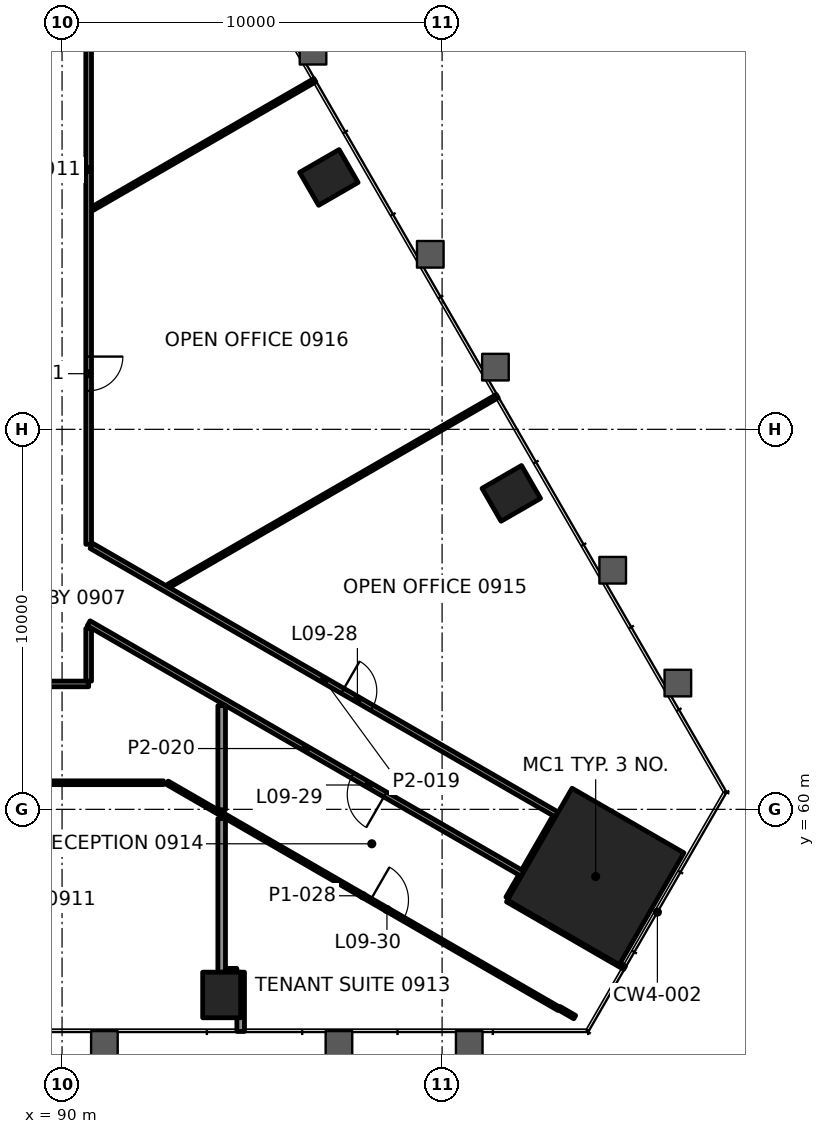
"""IFC4 building model, lengths in metres.
Left out: names, types, materials, properties, quantities, classifications, styles, units other than length and angle.
Written with IfcOpenShell. Run it as: python <this file> out.ifc"""

import sys

from ifc_helpers import new_model, si_unit, direction, frame, frame_2d, origin, origin_2d, place, context, subcontext, project, spatial, rectangle, extrude, element, fill, save


model = new_model("IFC4")
c1 = context("Model", 3, precision=1e-05, world=origin(), true_north=direction((0.0, 1.0)))
c2 = subcontext(c1, "Body", "Model", "MODEL_VIEW")
j1 = project(units=[si_unit("LENGTHUNIT", "METRE"), si_unit("PLANEANGLEUNIT", "RADIAN")], contexts=[c1])
p1 = place(None, origin())
s1 = spatial("IfcSite", under=j1, at=p1, CompositionType="ELEMENT")
p2 = place(p1, origin())
s2 = spatial("IfcBuilding", under=s1, at=p2, CompositionType="ELEMENT")
p3 = place(p2, frame((0.0, 0.0, 44.2)))
s3 = spatial("IfcBuildingStorey", under=s2, at=p3, CompositionType="ELEMENT", Elevation=44.2)
p4 = place(p3, frame((104.041, 58.233, 0.0), z_axis=(0.0, 0.0, 1.0), x_axis=(0.5, 0.866025403784, 0.0)))
e1 = element("IfcColumn", 1, at=p4, inside=s3, PredefinedType="COLUMN", context=c2, shape_type="SweptSolid", body=[
    extrude(rectangle(XDim=3.4, YDim=3.4, at=origin_2d()), origin(), (0.0, 0.0, 1.0), 4.2),
])
for number, where, z_axis, x_axis in (
    (2, (94.2, 55.115, -0.0), (0.0, 0.0, 1.0), (1.0, 0.0, 0.0)),
    (3, (101.821, 68.315, -0.0), (0.0, 0.0, 1.0), (-0.5, 0.866, 0.0)),
    (4, (97.021, 76.628, -0.0), (0.0, 0.0, 1.0), (-0.5, 0.866, 0.0)),
):
    element("IfcColumn", number, at=place(p3, frame(where, z_axis=z_axis, x_axis=x_axis)), inside=s3, PredefinedType="COLUMN", context=c2, shape_type="SweptSolid", body=[
        extrude(rectangle(XDim=1.0, YDim=1.2, at=origin_2d()), origin(), (0.0, 0.0, 1.0), 4.2),
    ])
p5 = place(p3, frame((94.3, 55.715, 0.0), z_axis=(0.0, 0.0, 1.0), x_axis=(1.0, 0.0, 0.0)))
e5 = element("IfcWall", 5, at=p5, inside=s3, PredefinedType="PARTITIONING", context=c2, shape_type="SweptSolid", body=[
    extrude(rectangle(XDim=0.3, YDim=0.2, at=frame_2d((0.15, 0.0))), origin(), (0.0, 0.0, 1.0), 3.4),
])
p6 = place(p3, frame((82.2, 60.7, 0.0), z_axis=(0.0, 0.0, 1.0), x_axis=(1.0, 0.0, 0.0)))
e6 = element("IfcWall", 6, at=p6, inside=s3, PredefinedType="PARTITIONING", context=c2, shape_type="SweptSolid", body=[
    extrude(rectangle(XDim=10.468, YDim=0.1, at=frame_2d((5.234, 0.0))), origin(), (0.0, 0.0, 1.0), 3.4),
])
p7 = place(p6, frame((4.634, 0.0, 0.0)))
e7 = element("IfcOpeningElement", 7, at=p7, cuts=e6, PredefinedType="OPENING", context=c2, shape_type="SweptSolid", body=[
    extrude(rectangle(XDim=1.2, YDim=2.1, at=frame_2d((0.6, 1.05))), frame((0.0, 0.06, 0.0), z_axis=(0.0, -1.0, 0.0), x_axis=(1.0, 0.0, 0.0)), (0.0, 0.0, 1.0), 0.12),
])
p8 = place(p3, frame((90.7, 63.3, 0.0), z_axis=(0.0, 0.0, 1.0), x_axis=(-1.0, 0.0, 0.0)))
e8 = element("IfcWall", 8, at=p8, inside=s3, PredefinedType="PARTITIONING", context=c2, shape_type="SweptSolid", body=[
    extrude(rectangle(XDim=31.4, YDim=0.15, at=frame_2d((15.7, 0.0))), origin(), (0.0, 0.0, 1.0), 3.4),
])
p9 = place(p8, frame((3.852, 0.0, 0.0)))
e9 = element("IfcOpeningElement", 9, at=p9, cuts=e8, PredefinedType="OPENING", context=c2, shape_type="SweptSolid", body=[
    extrude(rectangle(XDim=1.0, YDim=2.1, at=frame_2d((0.5, 1.05))), frame((0.0, 0.085, 0.0), z_axis=(0.0, -1.0, 0.0), x_axis=(1.0, 0.0, 0.0)), (0.0, 0.0, 1.0), 0.17),
])
p10 = place(p8, frame((11.5, 0.0, 0.0)))
e10 = element("IfcOpeningElement", 10, at=p10, cuts=e8, PredefinedType="OPENING", context=c2, shape_type="SweptSolid", body=[
    extrude(rectangle(XDim=1.2, YDim=2.1, at=frame_2d((0.6, 1.05))), frame((0.0, 0.085, 0.0), z_axis=(0.0, -1.0, 0.0), x_axis=(1.0, 0.0, 0.0)), (0.0, 0.0, 1.0), 0.17),
])
p11 = place(p8, frame((20.05, 0.0, 0.0)))
e11 = element("IfcOpeningElement", 11, at=p11, cuts=e8, PredefinedType="OPENING", context=c2, shape_type="SweptSolid", body=[
    extrude(rectangle(XDim=0.9, YDim=2.1, at=frame_2d((0.45, 1.05))), frame((0.0, 0.085, 0.0), z_axis=(0.0, -1.0, 0.0), x_axis=(1.0, 0.0, 0.0)), (0.0, 0.0, 1.0), 0.17),
])
p12 = place(p8, frame((27.749, 0.0, 0.0)))
e12 = element("IfcOpeningElement", 12, at=p12, cuts=e8, PredefinedType="OPENING", context=c2, shape_type="SweptSolid", body=[
    extrude(rectangle(XDim=1.0, YDim=2.1, at=frame_2d((0.5, 1.05))), frame((0.0, 0.085, 0.0), z_axis=(0.0, -1.0, 0.0), x_axis=(1.0, 0.0, 0.0)), (0.0, 0.0, 1.0), 0.17),
])
p13 = place(p3, frame((92.801, 65.878, 0.0), z_axis=(0.0, 0.0, 1.0), x_axis=(0.86602359872, 0.50000312645, 0.0)))
e13 = element("IfcWall", 13, at=p13, inside=s3, PredefinedType="PARTITIONING", context=c2, shape_type="SweptSolid", body=[
    extrude(rectangle(XDim=9.989, YDim=0.1, at=frame_2d((4.995, 0.0))), origin(), (0.0, 0.0, 1.0), 3.165),
])
p14 = place(p3, frame((90.801, 75.809, 0.0), z_axis=(0.0, 0.0, 1.0), x_axis=(0.866012872937, 0.500021703436, 0.0)))
e14 = element("IfcWall", 14, at=p14, inside=s3, PredefinedType="PARTITIONING", context=c2, shape_type="SweptSolid", body=[
    extrude(rectangle(XDim=6.756, YDim=0.1, at=frame_2d((3.378, 0.0))), origin(), (0.0, 0.0, 1.0), 3.165),
])
p15 = place(p3, frame((101.744, 57.655, 0.0), z_axis=(0.0, 0.0, 1.0), x_axis=(0.500108776725, 0.865962592404, 0.0)))
e15 = element("IfcWall", 15, at=p15, inside=s3, PredefinedType="PARTITIONING", context=c2, shape_type="SweptSolid", body=[
    extrude(rectangle(XDim=0.675, YDim=0.15, at=frame_2d((0.337, 0.0))), origin(), (0.0, 0.0, 1.0), 3.4),
])
p16 = place(p3, frame((94.7, 54.155, 0.0), z_axis=(0.0, 0.0, 1.0), x_axis=(0.0, 1.0, 0.0)))
e16 = element("IfcWall", 16, at=p16, inside=s3, PredefinedType="PARTITIONING", context=c2, shape_type="SweptSolid", body=[
    extrude(rectangle(XDim=1.56, YDim=0.2, at=frame_2d((0.78, 0.0))), origin(), (0.0, 0.0, 1.0), 3.4),
])
p17 = place(p3, frame((94.2, 55.715, 0.0), z_axis=(0.0, 0.0, 1.0), x_axis=(0.0, 1.0, 0.0)))
e17 = element("IfcWall", 17, at=p17, inside=s3, PredefinedType="PARTITIONING", context=c2, shape_type="SweptSolid", body=[
    extrude(rectangle(XDim=4.043, YDim=0.2, at=frame_2d((2.021, 0.0))), origin(), (0.0, 0.0, 1.0), 3.4),
])
p18 = place(p3, frame((90.7, 63.375, 0.0), z_axis=(0.0, 0.0, 1.0), x_axis=(0.0, 1.0, 0.0)))
e18 = element("IfcWall", 18, at=p18, inside=s3, PredefinedType="PARTITIONING", context=c2, shape_type="SweptSolid", body=[
    extrude(rectangle(XDim=1.385, YDim=0.15, at=frame_2d((0.692, 0.0))), origin(), (0.0, 0.0, 1.0), 3.247),
])
p19 = place(p3, frame((90.7, 86.699, 0.0), z_axis=(0.0, 0.0, 1.0), x_axis=(0.0, -1.0, 0.0)))
e19 = element("IfcWall", 19, at=p19, inside=s3, PredefinedType="PARTITIONING", context=c2, shape_type="SweptSolid", body=[
    extrude(rectangle(XDim=19.725, YDim=0.15, at=frame_2d((9.862, 0.0))), origin(), (0.0, 0.0, 1.0), 3.4),
])
p20 = place(p19, frame((14.785, 0.0, 0.0)))
e20 = element("IfcOpeningElement", 20, at=p20, cuts=e19, PredefinedType="OPENING", context=c2, shape_type="SweptSolid", body=[
    extrude(rectangle(XDim=0.9, YDim=2.1, at=frame_2d((0.45, 1.05))), frame((0.0, 0.085, 0.0), z_axis=(0.0, -1.0, 0.0), x_axis=(1.0, 0.0, 0.0)), (0.0, 0.0, 1.0), 0.17),
])
p21 = place(p3, frame((90.775, 66.932, 0.0), z_axis=(0.0, 0.0, 1.0), x_axis=(0.86602195393, -0.500005975275, 0.0)))
e21 = element("IfcWall", 21, at=p21, inside=s3, PredefinedType="PARTITIONING", context=c2, shape_type="SweptSolid", body=[
    extrude(rectangle(XDim=14.137, YDim=0.15, at=frame_2d((7.069, 0.0))), origin(), (0.0, 0.0, 1.0), 3.4),
])
p22 = place(p21, frame((7.629, 0.0, 0.0)))
e22 = element("IfcOpeningElement", 22, at=p22, cuts=e21, PredefinedType="OPENING", context=c2, shape_type="SweptSolid", body=[
    extrude(rectangle(XDim=0.9, YDim=2.1, at=frame_2d((0.45, 1.05))), frame((0.0, 0.085, 0.0), z_axis=(0.0, -1.0, 0.0), x_axis=(1.0, 0.0, 0.0)), (0.0, 0.0, 1.0), 0.17),
])
p23 = place(p3, frame((102.118, 58.304, 0.0), z_axis=(0.0, 0.0, 1.0), x_axis=(-0.866022774611, 0.500004553834, 0.0)))
e23 = element("IfcWall", 23, at=p23, inside=s3, PredefinedType="PARTITIONING", context=c2, shape_type="SweptSolid", body=[
    extrude(rectangle(XDim=13.185, YDim=0.15, at=frame_2d((6.593, 0.0))), origin(), (0.0, 0.0, 1.0), 3.247),
])
p24 = place(p23, frame((4.173, 0.0, 0.0)))
e24 = element("IfcOpeningElement", 24, at=p24, cuts=e23, PredefinedType="OPENING", context=c2, shape_type="SweptSolid", body=[
    extrude(rectangle(XDim=1.0, YDim=2.1, at=frame_2d((0.5, 1.05))), frame((0.0, 0.085, 0.0), z_axis=(0.0, -1.0, 0.0), x_axis=(1.0, 0.0, 0.0)), (0.0, 0.0, 1.0), 0.17),
])
p25 = place(p3, frame((104.802, 55.831, 0.0), z_axis=(0.0, 0.0, 1.0), x_axis=(-0.866014251095, 0.500019316528, 0.0)))
e25 = element("IfcWall", 25, at=p25, inside=s3, PredefinedType="PARTITIONING", context=c2, shape_type="SweptSolid", body=[
    extrude(rectangle(XDim=3.559, YDim=0.1, at=frame_2d((1.78, 0.0))), origin(), (0.0, 0.0, 1.0), 3.4),
])
p26 = place(p3, frame((103.49, 54.532, 0.0), z_axis=(0.0, 0.0, 1.0), x_axis=(-0.866073792734, 0.499916178513, 0.0)))
e26 = element("IfcWall", 26, at=p26, inside=s3, PredefinedType="PARTITIONING", context=c2, shape_type="SweptSolid", body=[
    extrude(rectangle(XDim=0.473, YDim=0.1, at=frame_2d((0.236, 0.0))), origin(), (0.0, 0.0, 1.0), 3.4),
])
p27 = place(p3, frame((92.768, 60.7, 0.0), z_axis=(0.0, 0.0, 1.0), x_axis=(0.866025640697, -0.499999589656, 0.0)))
e27 = element("IfcWall", 27, at=p27, inside=s3, PredefinedType="PARTITIONING", context=c2, shape_type="SweptSolid", body=[
    extrude(rectangle(XDim=11.896, YDim=0.1, at=frame_2d((5.948, 0.0))), origin(), (0.0, 0.0, 1.0), 3.4),
])
p28 = place(p27, frame((6.175, 0.0, 0.0)))
e28 = element("IfcOpeningElement", 28, at=p28, cuts=e27, PredefinedType="OPENING", context=c2, shape_type="SweptSolid", body=[
    extrude(rectangle(XDim=1.0, YDim=2.1, at=frame_2d((0.5, 1.05))), frame((0.0, 0.06, 0.0), z_axis=(0.0, -1.0, 0.0), x_axis=(1.0, 0.0, 0.0)), (0.0, 0.0, 1.0), 0.12),
])
p29 = place(p3, frame((102.157, 58.369, 0.0), z_axis=(0.0, 0.0, 1.0), x_axis=(0.500055614084, 0.865993292597, 0.0)))
e29 = element("IfcWall", 29, at=p29, inside=s3, PredefinedType="PARTITIONING", context=c2, shape_type="SweptSolid", body=[
    extrude(rectangle(XDim=1.649, YDim=0.15, at=frame_2d((0.825, 0.0))), origin(), (0.0, 0.0, 1.0), 3.247),
])
p30 = place(p3, frame((94.2, 59.989, 0.0), z_axis=(0.0, 0.0, 1.0), x_axis=(0.0, 1.0, 0.0)))
e30 = element("IfcWall", 30, at=p30, inside=s3, PredefinedType="PARTITIONING", context=c2, shape_type="SweptSolid", body=[
    extrude(rectangle(XDim=2.74, YDim=0.2, at=frame_2d((1.37, 0.0))), origin(), (0.0, 0.0, 1.0), 3.4),
])
p31 = place(p20, origin())
e31 = element("IfcDoor", 31, at=p31, inside=s3, OperationType="SINGLE_SWING_RIGHT", PredefinedType="DOOR", context=c2, shape_type="SweptSolid", body=[
    extrude(rectangle(XDim=0.9, YDim=2.1, at=frame_2d((0.45, 1.05))), frame((0.0, 0.025, 0.0), z_axis=(0.0, -1.0, 0.0), x_axis=(1.0, 0.0, 0.0)), (0.0, 0.0, 1.0), 0.05),
])
fill(e20, e31)
p32 = place(p22, origin())
e32 = element("IfcDoor", 32, at=p32, inside=s3, OperationType="SINGLE_SWING_LEFT", PredefinedType="DOOR", context=c2, shape_type="SweptSolid", body=[
    extrude(rectangle(XDim=0.9, YDim=2.1, at=frame_2d((0.45, 1.05))), frame((0.0, 0.025, 0.0), z_axis=(0.0, -1.0, 0.0), x_axis=(1.0, 0.0, 0.0)), (0.0, 0.0, 1.0), 0.05),
])
fill(e22, e32)
p33 = place(p24, origin())
e33 = element("IfcDoor", 33, at=p33, inside=s3, OperationType="SINGLE_SWING_LEFT", PredefinedType="DOOR", context=c2, shape_type="SweptSolid", body=[
    extrude(rectangle(XDim=1.0, YDim=2.1, at=frame_2d((0.5, 1.05))), frame((0.0, 0.025, 0.0), z_axis=(0.0, -1.0, 0.0), x_axis=(1.0, 0.0, 0.0)), (0.0, 0.0, 1.0), 0.05),
])
fill(e24, e33)
p34 = place(p28, origin())
e34 = element("IfcDoor", 34, at=p34, inside=s3, OperationType="SINGLE_SWING_LEFT", PredefinedType="DOOR", context=c2, shape_type="SweptSolid", body=[
    extrude(rectangle(XDim=1.0, YDim=2.1, at=frame_2d((0.5, 1.05))), frame((0.0, 0.025, 0.0), z_axis=(0.0, -1.0, 0.0), x_axis=(1.0, 0.0, 0.0)), (0.0, 0.0, 1.0), 0.05),
])
fill(e28, e34)
save(model, sys.argv[1])
